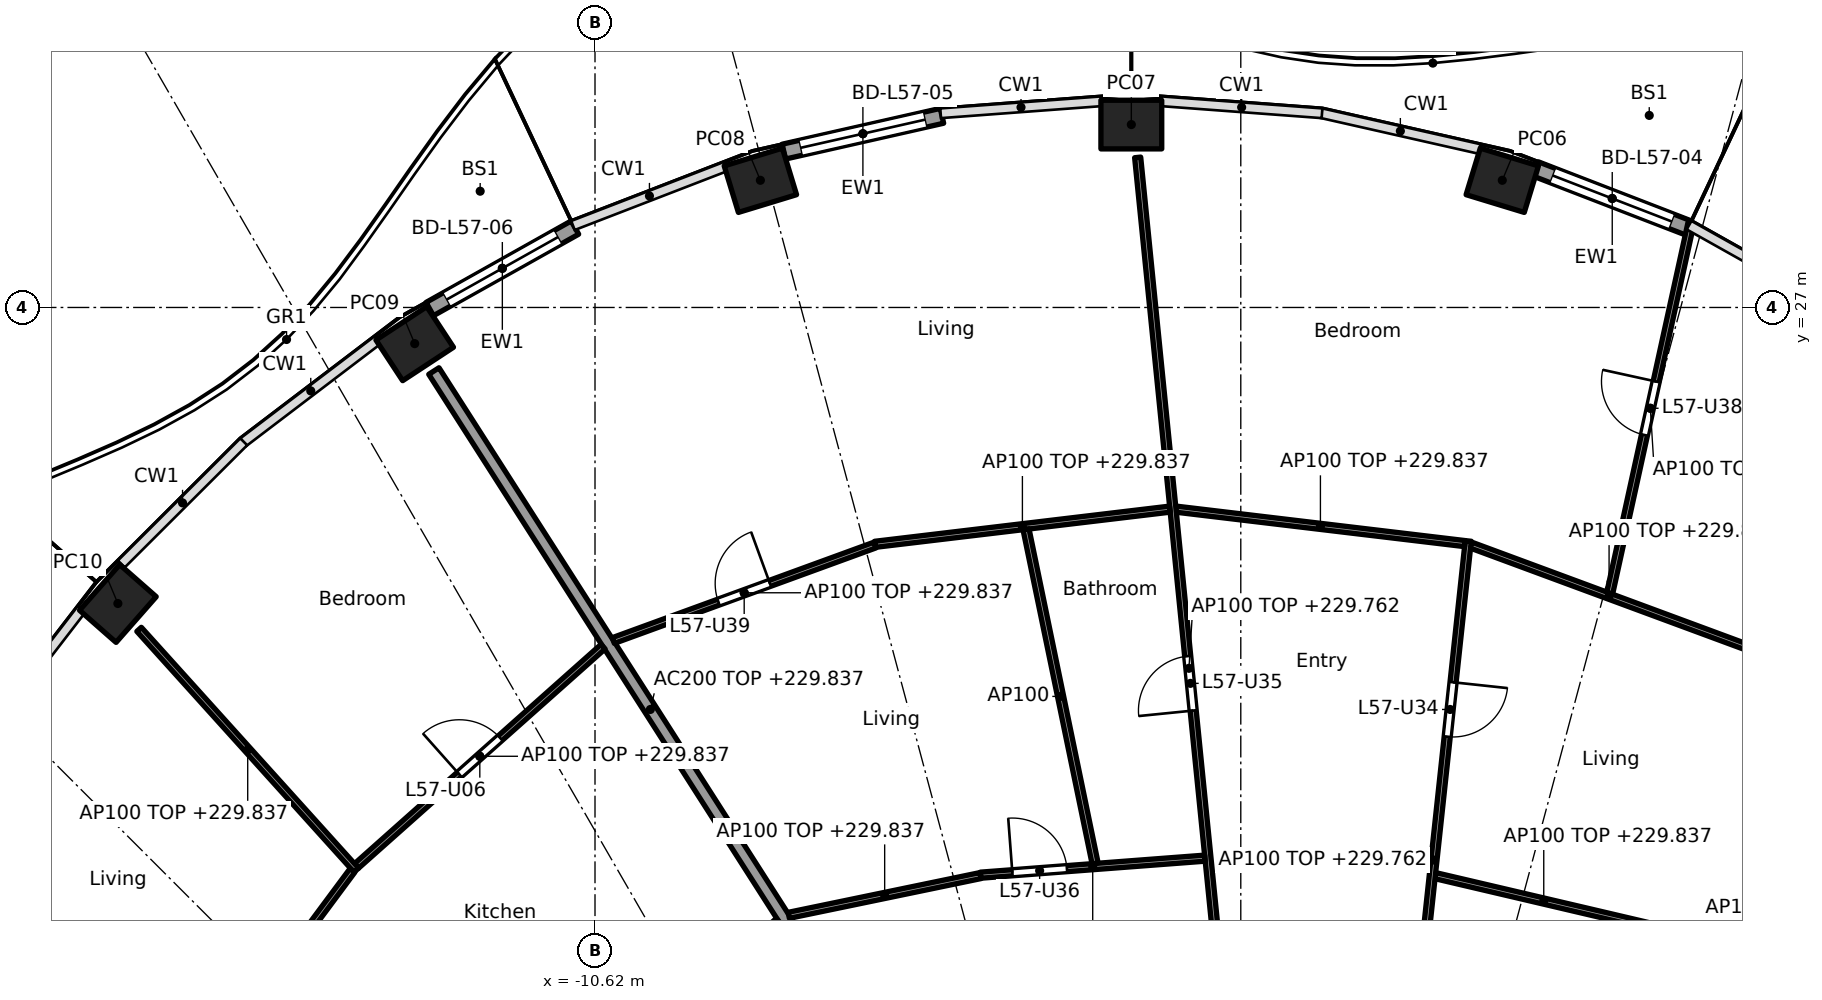
"""IFC4 building model, lengths in metres.
Left out: names, types, materials, properties, quantities, classifications, styles, units other than length and angle.
Written with IfcOpenShell. Run it as: python <this file> out.ifc"""

import sys

from ifc_helpers import new_model, si_unit, direction, frame, frame_2d, origin, origin_2d, place, context, subcontext, project, spatial, rectangle, hollow_rectangle, extrude, element, fill, save


model = new_model("IFC4")
c1 = context("Model", 3, precision=1e-05, world=origin(), true_north=direction((0.0, 1.0)))
c2 = subcontext(c1, "Body", "Model", "MODEL_VIEW")
j1 = project(units=[si_unit("LENGTHUNIT", "METRE"), si_unit("PLANEANGLEUNIT", "RADIAN")], contexts=[c1])
p1 = place(None, origin())
s1 = spatial("IfcSite", under=j1, at=p1, CompositionType="ELEMENT")
p2 = place(p1, origin())
s2 = spatial("IfcBuilding", under=s1, at=p2, CompositionType="ELEMENT")
p3 = place(p2, frame((0.0, 0.0, 227.0)))
s3 = spatial("IfcBuildingStorey", under=s2, at=p3, CompositionType="ELEMENT", Elevation=227.0)
for number, where, z_axis, x_axis in (
    (1, (4.3, 29.092, 0.0), (0.0, 0.0, 1.0), (-0.957, 0.292, 0.0)),
    (2, (-1.8, 30.008, 0.0), (0.0, 0.0, 1.0), (-1.0, 0.0, 0.0)),
    (3, (-7.9, 29.092, 0.0), (0.0, 0.0, 1.0), (-0.957, -0.292, 0.0)),
    (4, (-13.585, 26.405, 0.0), (0.0, 0.0, 1.0), (-0.836, -0.549, 0.0)),
    (5, (-18.467, 22.132, 0.0), (0.0, 0.0, 1.0), (-0.66, -0.751, 0.0)),
):
    element("IfcColumn", number, at=place(p3, frame(where, z_axis=z_axis, x_axis=x_axis)), inside=s3, PredefinedType="COLUMN", context=c2, shape_type="SweptSolid", body=[
        extrude(hollow_rectangle(XDim=1.0, YDim=0.8, WallThickness=0.032, at=origin_2d()), origin(), (0.0, 0.0, 1.0), 3.7),
    ])
p4 = place(p3, frame((4.851, 29.278, 0.0), z_axis=(0.0, 0.0, 1.0), x_axis=(0.932838255163, -0.360295420044, 0.0)))
e6 = element("IfcWall", 6, at=p4, inside=s3, PredefinedType="SOLIDWALL", context=c2, shape_type="SweptSolid", body=[
    extrude(rectangle(XDim=2.696, YDim=0.25, at=frame_2d((1.348, 0.0))), origin(), (0.0, 0.0, 1.0), 3.44),
])
p5 = place(p4, frame((0.298, 0.0, 0.0)))
e7 = element("IfcOpeningElement", 7, at=p5, cuts=e6, PredefinedType="OPENING", context=c2, shape_type="SweptSolid", body=[
    extrude(rectangle(XDim=2.1, YDim=2.4, at=frame_2d((1.05, 1.2))), frame((0.0, 0.135, 0.0), z_axis=(0.0, -1.0, 0.0), x_axis=(1.0, 0.0, 0.0)), (0.0, 0.0, 1.0), 0.27),
])
p6 = place(p3, frame((-7.514, 29.563, 0.0), z_axis=(0.0, 0.0, 1.0), x_axis=(0.975324089124, 0.220777990694, 0.0)))
e8 = element("IfcWall", 8, at=p6, inside=s3, PredefinedType="SOLIDWALL", context=c2, shape_type="SweptSolid", body=[
    extrude(rectangle(XDim=2.666, YDim=0.25, at=frame_2d((1.333, 0.0))), origin(), (0.0, 0.0, 1.0), 3.44),
])
p7 = place(p6, frame((0.283, 0.0, 0.0)))
e9 = element("IfcOpeningElement", 9, at=p7, cuts=e8, PredefinedType="OPENING", context=c2, shape_type="SweptSolid", body=[
    extrude(rectangle(XDim=2.1, YDim=2.4, at=frame_2d((1.05, 1.2))), frame((0.0, 0.135, 0.0), z_axis=(0.0, -1.0, 0.0), x_axis=(1.0, 0.0, 0.0)), (0.0, 0.0, 1.0), 0.27),
])
p8 = place(p3, frame((-13.338, 26.974, 0.0), z_axis=(0.0, 0.0, 1.0), x_axis=(0.872101280701, 0.489325409313, 0.0)))
e10 = element("IfcWall", 10, at=p8, inside=s3, PredefinedType="SOLIDWALL", context=c2, shape_type="SweptSolid", body=[
    extrude(rectangle(XDim=2.738, YDim=0.25, at=frame_2d((1.369, 0.0))), origin(), (0.0, 0.0, 1.0), 3.44),
])
p9 = place(p8, frame((0.319, 0.0, 0.0)))
e11 = element("IfcOpeningElement", 11, at=p9, cuts=e10, PredefinedType="OPENING", context=c2, shape_type="SweptSolid", body=[
    extrude(rectangle(XDim=2.1, YDim=2.4, at=frame_2d((1.05, 1.2))), frame((0.0, 0.135, 0.0), z_axis=(0.0, -1.0, 0.0), x_axis=(1.0, 0.0, 0.0)), (0.0, 0.0, 1.0), 0.27),
])
p10 = place(p3, frame((-6.15, 14.824, 0.0), z_axis=(0.0, 0.0, 1.0), x_axis=(-0.538870687577, 0.842388498301, 0.0)))
e12 = element("IfcWall", 12, at=p10, inside=s3, PredefinedType="PARTITIONING", context=c2, shape_type="SweptSolid", body=[
    extrude(rectangle(XDim=13.213, YDim=0.2, at=frame_2d((6.606, 0.0))), origin(), (0.0, 0.0, 1.0), 2.837),
])
p11 = place(p3, frame((6.766, 16.82, 0.0), z_axis=(0.0, 0.0, 1.0), x_axis=(-0.973612608559, 0.22820711745, 0.0)))
e13 = element("IfcWall", 13, at=p11, inside=s3, PredefinedType="PARTITIONING", context=c2, shape_type="SweptSolid", body=[
    extrude(rectangle(XDim=3.663, YDim=0.1, at=frame_2d((1.832, 0.0))), origin(), (0.0, 0.0, 1.0), 2.837),
])
p12 = place(p3, frame((8.331, 21.411, 0.0), z_axis=(0.0, 0.0, 1.0), x_axis=(-0.937891982431, 0.346927412136, 0.0)))
e14 = element("IfcWall", 14, at=p12, inside=s3, PredefinedType="PARTITIONING", context=c2, shape_type="SweptSolid", body=[
    extrude(rectangle(XDim=4.85, YDim=0.1, at=frame_2d((2.425, 0.0))), origin(), (0.0, 0.0, 1.0), 2.837),
])
p13 = place(p3, frame((6.067, 22.301, 0.0), z_axis=(0.0, 0.0, 1.0), x_axis=(0.214401821533, 0.976745544614, 0.0)))
e15 = element("IfcWall", 15, at=p13, inside=s3, PredefinedType="PARTITIONING", context=c2, shape_type="SweptSolid", body=[
    extrude(rectangle(XDim=6.228, YDim=0.1, at=frame_2d((3.114, 0.0))), origin(), (0.0, 0.0, 1.0), 2.983),
])
p14 = place(p13, frame((2.664, 0.0, 0.0)))
e16 = element("IfcOpeningElement", 16, at=p14, cuts=e15, PredefinedType="OPENING", context=c2, shape_type="SweptSolid", body=[
    extrude(rectangle(XDim=0.9, YDim=2.1, at=frame_2d((0.45, 1.05))), frame((0.0, 0.06, 0.0), z_axis=(0.0, -1.0, 0.0), x_axis=(1.0, 0.0, 0.0)), (0.0, 0.0, 1.0), 0.12),
])
p15 = place(p3, frame((2.613, 12.664, 0.0), z_axis=(0.0, 0.0, 1.0), x_axis=(0.106823825758, 0.994277964279, 0.0)))
e17 = element("IfcWall", 17, at=p15, inside=s3, PredefinedType="PARTITIONING", context=c2, shape_type="SweptSolid", body=[
    extrude(rectangle(XDim=10.556, YDim=0.1, at=frame_2d((5.278, 0.0))), origin(), (0.0, 0.0, 1.0), 2.762),
])
p16 = place(p15, frame((2.066, 0.0, 0.0)))
e18 = element("IfcOpeningElement", 18, at=p16, cuts=e17, PredefinedType="OPENING", context=c2, shape_type="SweptSolid", body=[
    extrude(rectangle(XDim=0.9, YDim=2.1, at=frame_2d((0.45, 1.05))), frame((0.0, 0.06, 0.0), z_axis=(0.0, -1.0, 0.0), x_axis=(1.0, 0.0, 0.0)), (0.0, 0.0, 1.0), 0.12),
])
p17 = place(p15, frame((7.32, 0.0, 0.0)))
e19 = element("IfcOpeningElement", 19, at=p17, cuts=e17, PredefinedType="OPENING", context=c2, shape_type="SweptSolid", body=[
    extrude(rectangle(XDim=0.9, YDim=2.1, at=frame_2d((0.45, 1.05))), frame((0.0, 0.06, 0.0), z_axis=(0.0, -1.0, 0.0), x_axis=(1.0, 0.0, 0.0)), (0.0, 0.0, 1.0), 0.12),
])
p18 = place(p3, frame((3.686, 23.117, 0.0), z_axis=(0.0, 0.0, 1.0), x_axis=(-0.992965872314, 0.11840091393, 0.0)))
e20 = element("IfcWall", 20, at=p18, inside=s3, PredefinedType="PARTITIONING", context=c2, shape_type="SweptSolid", body=[
    extrude(rectangle(XDim=4.786, YDim=0.1, at=frame_2d((2.393, 0.0))), origin(), (0.0, 0.0, 1.0), 2.837),
])
p19 = place(p3, frame((-0.01, 12.664, 0.0), z_axis=(0.0, 0.0, 1.0), x_axis=(-0.099808591851, 0.995006655753, 0.0)))
e21 = element("IfcWall", 21, at=p19, inside=s3, PredefinedType="PARTITIONING", context=c2, shape_type="SweptSolid", body=[
    extrude(rectangle(XDim=16.888, YDim=0.1, at=frame_2d((8.444, 0.0))), origin(), (0.0, 0.0, 1.0), 2.762),
])
p20 = place(p19, frame((2.205, 0.0, 0.0)))
e22 = element("IfcOpeningElement", 22, at=p20, cuts=e21, PredefinedType="OPENING", context=c2, shape_type="SweptSolid", body=[
    extrude(rectangle(XDim=0.9, YDim=2.1, at=frame_2d((0.45, 1.05))), frame((0.0, 0.06, 0.0), z_axis=(0.0, -1.0, 0.0), x_axis=(1.0, 0.0, 0.0)), (0.0, 0.0, 1.0), 0.12),
])
p21 = place(p19, frame((7.745, 0.0, 0.0)))
e23 = element("IfcOpeningElement", 23, at=p21, cuts=e21, PredefinedType="OPENING", context=c2, shape_type="SweptSolid", body=[
    extrude(rectangle(XDim=0.9, YDim=2.1, at=frame_2d((0.45, 1.05))), frame((0.0, 0.06, 0.0), z_axis=(0.0, -1.0, 0.0), x_axis=(1.0, 0.0, 0.0)), (0.0, 0.0, 1.0), 0.12),
])
p22 = place(p3, frame((-0.59, 17.944, 0.0), z_axis=(0.0, 0.0, 1.0), x_axis=(-0.997133495787, -0.075662352452, 0.0)))
e24 = element("IfcWall", 24, at=p22, inside=s3, PredefinedType="PARTITIONING", context=c2, shape_type="SweptSolid", body=[
    extrude(rectangle(XDim=3.701, YDim=0.1, at=frame_2d((1.851, 0.0))), origin(), (0.0, 0.0, 1.0), 2.837),
])
p23 = place(p22, frame((2.276, 0.0, 0.0)))
e25 = element("IfcOpeningElement", 25, at=p23, cuts=e24, PredefinedType="OPENING", context=c2, shape_type="SweptSolid", body=[
    extrude(rectangle(XDim=0.9, YDim=2.1, at=frame_2d((0.45, 1.05))), frame((0.0, 0.06, 0.0), z_axis=(0.0, -1.0, 0.0), x_axis=(1.0, 0.0, 0.0)), (0.0, 0.0, 1.0), 0.12),
])
p24 = place(p3, frame((-1.166, 23.683, 0.0), z_axis=(0.0, 0.0, 1.0), x_axis=(-0.992961712415, -0.118435795593, 0.0)))
e26 = element("IfcWall", 26, at=p24, inside=s3, PredefinedType="PARTITIONING", context=c2, shape_type="SweptSolid", body=[
    extrude(rectangle(XDim=4.885, YDim=0.1, at=frame_2d((2.443, 0.0))), origin(), (0.0, 0.0, 1.0), 2.837),
])
p25 = place(p3, frame((-2.395, 17.857, 0.0), z_axis=(0.0, 0.0, 1.0), x_axis=(-0.20251351451, 0.979279467997, 0.0)))
e27 = element("IfcWall", 27, at=p25, inside=s3, PredefinedType="PARTITIONING", context=c2, shape_type="SweptSolid", body=[
    extrude(rectangle(XDim=5.611, YDim=0.1, at=frame_2d((2.805, 0.0))), origin(), (0.0, 0.0, 1.0), 3.44),
])
p26 = place(p3, frame((-4.28, 17.657, 0.0), z_axis=(0.0, 0.0, 1.0), x_axis=(-0.979195545385, -0.202918909661, 0.0)))
e28 = element("IfcWall", 28, at=p26, inside=s3, PredefinedType="PARTITIONING", context=c2, shape_type="SweptSolid", body=[
    extrude(rectangle(XDim=3.221, YDim=0.1, at=frame_2d((1.61, 0.0))), origin(), (0.0, 0.0, 1.0), 2.837),
])
p27 = place(p3, frame((-6.014, 23.094, 0.0), z_axis=(0.0, 0.0, 1.0), x_axis=(-0.939433575811, -0.342731026665, 0.0)))
e29 = element("IfcWall", 29, at=p27, inside=s3, PredefinedType="PARTITIONING", context=c2, shape_type="SweptSolid", body=[
    extrude(rectangle(XDim=4.583, YDim=0.1, at=frame_2d((2.291, 0.0))), origin(), (0.0, 0.0, 1.0), 2.837),
])
p28 = place(p27, frame((1.841, 0.0, 0.0)))
e30 = element("IfcOpeningElement", 30, at=p28, cuts=e29, PredefinedType="OPENING", context=c2, shape_type="SweptSolid", body=[
    extrude(rectangle(XDim=0.9, YDim=2.1, at=frame_2d((0.45, 1.05))), frame((0.0, 0.06, 0.0), z_axis=(0.0, -1.0, 0.0), x_axis=(1.0, 0.0, 0.0)), (0.0, 0.0, 1.0), 0.12),
])
p29 = place(p3, frame((-7.605, 16.917, 0.0), z_axis=(0.0, 0.0, 1.0), x_axis=(-0.739828340504, -0.672795679673, 0.0)))
e31 = element("IfcWall", 31, at=p29, inside=s3, PredefinedType="PARTITIONING", context=c2, shape_type="SweptSolid", body=[
    extrude(rectangle(XDim=4.647, YDim=0.1, at=frame_2d((2.324, 0.0))), origin(), (0.0, 0.0, 1.0), 2.837),
])
p30 = place(p3, frame((-10.488, 21.422, 0.0), z_axis=(0.0, 0.0, 1.0), x_axis=(-0.747148551049, -0.664657086523, 0.0)))
e32 = element("IfcWall", 32, at=p30, inside=s3, PredefinedType="PARTITIONING", context=c2, shape_type="SweptSolid", body=[
    extrude(rectangle(XDim=5.425, YDim=0.1, at=frame_2d((2.712, 0.0))), origin(), (0.0, 0.0, 1.0), 2.837),
])
p31 = place(p30, frame((2.262, 0.0, 0.0)))
e33 = element("IfcOpeningElement", 33, at=p31, cuts=e32, PredefinedType="OPENING", context=c2, shape_type="SweptSolid", body=[
    extrude(rectangle(XDim=0.9, YDim=2.1, at=frame_2d((0.45, 1.05))), frame((0.0, 0.06, 0.0), z_axis=(0.0, -1.0, 0.0), x_axis=(1.0, 0.0, 0.0)), (0.0, 0.0, 1.0), 0.12),
])
p32 = place(p3, frame((-14.545, 17.746, 0.0), z_axis=(0.0, 0.0, 1.0), x_axis=(-0.669829144173, 0.742515264232, 0.0)))
e34 = element("IfcWall", 34, at=p32, inside=s3, PredefinedType="PARTITIONING", context=c2, shape_type="SweptSolid", body=[
    extrude(rectangle(XDim=5.334, YDim=0.1, at=frame_2d((2.667, 0.0))), origin(), (0.0, 0.0, 1.0), 2.837),
])
p33 = place(p3, frame((-14.608, 17.743, 0.0), z_axis=(0.0, 0.0, 1.0), x_axis=(-0.596174489482, -0.8028548923, 0.0)))
e35 = element("IfcWall", 35, at=p33, inside=s3, PredefinedType="PARTITIONING", context=c2, shape_type="SweptSolid", body=[
    extrude(rectangle(XDim=5.442, YDim=0.1, at=frame_2d((2.721, 0.0))), origin(), (0.0, 0.0, 1.0), 2.837),
])
p34 = place(p5, origin())
e36 = element("IfcDoor", 36, at=p34, inside=s3, OperationType="SLIDING_TO_LEFT", PredefinedType="DOOR", context=c2, shape_type="SweptSolid", body=[
    extrude(rectangle(XDim=2.1, YDim=2.4, at=frame_2d((1.05, 1.2))), frame((0.0, 0.025, 0.0), z_axis=(0.0, -1.0, 0.0), x_axis=(1.0, 0.0, 0.0)), (0.0, 0.0, 1.0), 0.05),
])
fill(e7, e36)
p35 = place(p7, origin())
e37 = element("IfcDoor", 37, at=p35, inside=s3, OperationType="SLIDING_TO_LEFT", PredefinedType="DOOR", context=c2, shape_type="SweptSolid", body=[
    extrude(rectangle(XDim=2.1, YDim=2.4, at=frame_2d((1.05, 1.2))), frame((0.0, 0.025, 0.0), z_axis=(0.0, -1.0, 0.0), x_axis=(1.0, 0.0, 0.0)), (0.0, 0.0, 1.0), 0.05),
])
fill(e9, e37)
p36 = place(p9, origin())
e38 = element("IfcDoor", 38, at=p36, inside=s3, OperationType="SLIDING_TO_LEFT", PredefinedType="DOOR", context=c2, shape_type="SweptSolid", body=[
    extrude(rectangle(XDim=2.1, YDim=2.4, at=frame_2d((1.05, 1.2))), frame((0.0, 0.025, 0.0), z_axis=(0.0, -1.0, 0.0), x_axis=(1.0, 0.0, 0.0)), (0.0, 0.0, 1.0), 0.05),
])
fill(e11, e38)
p37 = place(p31, frame((0.9, 0.0, 0.0), x_axis=(-1.0, 0.0, 0.0)))
e39 = element("IfcDoor", 39, at=p37, inside=s3, OperationType="SINGLE_SWING_LEFT", PredefinedType="DOOR", context=c2, shape_type="SweptSolid", body=[
    extrude(rectangle(XDim=0.9, YDim=2.1, at=frame_2d((0.45, 1.05))), frame((0.0, 0.025, 0.0), z_axis=(0.0, -1.0, 0.0), x_axis=(1.0, 0.0, 0.0)), (0.0, 0.0, 1.0), 0.05),
])
fill(e33, e39)
p38 = place(p17, frame((0.9, 0.0, 0.0), x_axis=(-1.0, 0.0, 0.0)))
e40 = element("IfcDoor", 40, at=p38, inside=s3, OperationType="SINGLE_SWING_LEFT", PredefinedType="DOOR", context=c2, shape_type="SweptSolid", body=[
    extrude(rectangle(XDim=0.9, YDim=2.1, at=frame_2d((0.45, 1.05))), frame((0.0, 0.025, 0.0), z_axis=(0.0, -1.0, 0.0), x_axis=(1.0, 0.0, 0.0)), (0.0, 0.0, 1.0), 0.05),
])
fill(e19, e40)
p39 = place(p21, origin())
e41 = element("IfcDoor", 41, at=p39, inside=s3, OperationType="SINGLE_SWING_LEFT", PredefinedType="DOOR", context=c2, shape_type="SweptSolid", body=[
    extrude(rectangle(XDim=0.9, YDim=2.1, at=frame_2d((0.45, 1.05))), frame((0.0, 0.025, 0.0), z_axis=(0.0, -1.0, 0.0), x_axis=(1.0, 0.0, 0.0)), (0.0, 0.0, 1.0), 0.05),
])
fill(e23, e41)
p40 = place(p23, frame((0.9, 0.0, 0.0), x_axis=(-1.0, 0.0, 0.0)))
e42 = element("IfcDoor", 42, at=p40, inside=s3, OperationType="SINGLE_SWING_LEFT", PredefinedType="DOOR", context=c2, shape_type="SweptSolid", body=[
    extrude(rectangle(XDim=0.9, YDim=2.1, at=frame_2d((0.45, 1.05))), frame((0.0, 0.025, 0.0), z_axis=(0.0, -1.0, 0.0), x_axis=(1.0, 0.0, 0.0)), (0.0, 0.0, 1.0), 0.05),
])
fill(e25, e42)
p41 = place(p14, origin())
e43 = element("IfcDoor", 43, at=p41, inside=s3, OperationType="SINGLE_SWING_RIGHT", PredefinedType="DOOR", context=c2, shape_type="SweptSolid", body=[
    extrude(rectangle(XDim=0.9, YDim=2.1, at=frame_2d((0.45, 1.05))), frame((0.0, 0.025, 0.0), z_axis=(0.0, -1.0, 0.0), x_axis=(1.0, 0.0, 0.0)), (0.0, 0.0, 1.0), 0.05),
])
fill(e16, e43)
p42 = place(p28, frame((0.9, 0.0, 0.0), x_axis=(-1.0, 0.0, 0.0)))
e44 = element("IfcDoor", 44, at=p42, inside=s3, OperationType="SINGLE_SWING_RIGHT", PredefinedType="DOOR", context=c2, shape_type="SweptSolid", body=[
    extrude(rectangle(XDim=0.9, YDim=2.1, at=frame_2d((0.45, 1.05))), frame((0.0, 0.025, 0.0), z_axis=(0.0, -1.0, 0.0), x_axis=(1.0, 0.0, 0.0)), (0.0, 0.0, 1.0), 0.05),
])
fill(e30, e44)
save(model, sys.argv[1])
